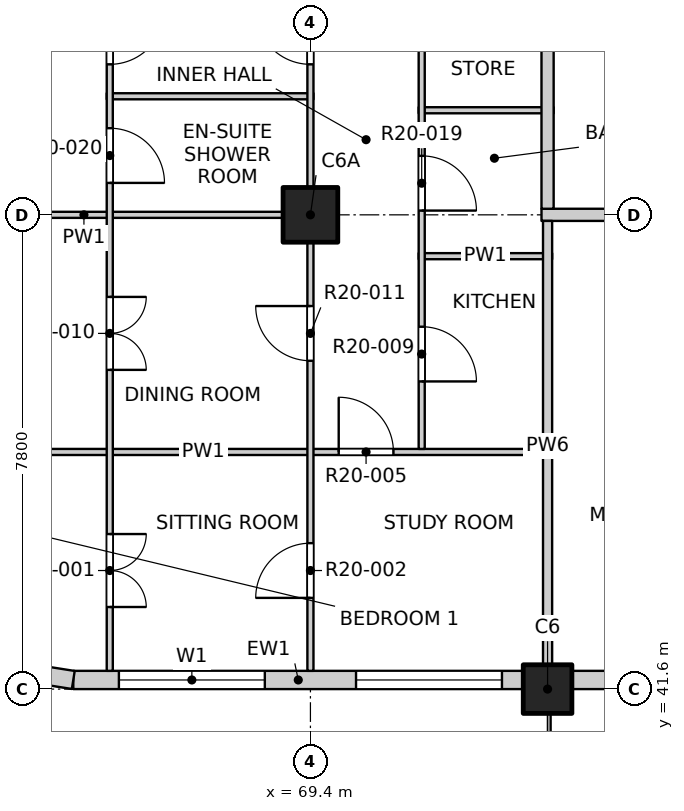
"""IFC4 building model, lengths in metres.
Left out: names, types, materials, properties, quantities, classifications, styles, units other than length and angle.
Written with IfcOpenShell. Run it as: python <this file> out.ifc"""

import sys

from ifc_helpers import new_model, si_unit, direction, frame, frame_2d, origin, origin_2d, place, context, subcontext, project, spatial, rectangle, extrude, element, fill, save


model = new_model("IFC4")
c1 = context("Model", 3, precision=1e-05, world=origin(), true_north=direction((0.0, 1.0)))
c2 = subcontext(c1, "Body", "Model", "MODEL_VIEW")
j1 = project(units=[si_unit("LENGTHUNIT", "METRE"), si_unit("PLANEANGLEUNIT", "RADIAN")], contexts=[c1])
p1 = place(None, origin())
s1 = spatial("IfcSite", under=j1, at=p1, CompositionType="ELEMENT")
p2 = place(p1, origin())
s2 = spatial("IfcBuilding", under=s1, at=p2, CompositionType="ELEMENT")
p3 = place(p2, frame((0.0, 0.0, 210.9)))
s3 = spatial("IfcBuildingStorey", under=s2, at=p3, CompositionType="ELEMENT", Elevation=210.9)
p4 = place(p3, frame((73.3, 41.6, -0.25), z_axis=(0.0, 0.0, 1.0), x_axis=(1.0, 0.0, 0.0)))
e1 = element("IfcColumn", 1, at=p4, inside=s3, PredefinedType="COLUMN", context=c2, shape_type="SweptSolid", body=[
    extrude(rectangle(XDim=0.8, YDim=0.8, at=origin_2d()), origin(), (0.0, 0.0, 1.0), 3.4),
])
p5 = place(p3, frame((69.4, 49.4, -0.25), z_axis=(0.0, 0.0, 1.0), x_axis=(1.0, 0.0, 0.0)))
e2 = element("IfcColumn", 2, at=p5, inside=s3, PredefinedType="COLUMN", context=c2, shape_type="SweptSolid", body=[
    extrude(rectangle(XDim=0.9, YDim=0.9, at=origin_2d()), origin(), (0.0, 0.0, 1.0), 3.4),
])
p6 = place(p3, frame((65.5, 41.75, 0.0), z_axis=(0.0, 0.0, 1.0), x_axis=(1.0, 0.0, 0.0)))
e3 = element("IfcWall", 3, at=p6, inside=s3, PredefinedType="SOLIDWALL", context=c2, shape_type="SweptSolid", body=[
    extrude(rectangle(XDim=7.4, YDim=0.3, at=frame_2d((3.7, 0.0))), origin(), (0.0, 0.0, 1.0), 2.7),
])
p7 = place(p6, frame((0.75, 0.0, 0.9)))
e4 = element("IfcOpeningElement", 4, at=p7, cuts=e3, PredefinedType="OPENING", context=c2, shape_type="SweptSolid", body=[
    extrude(rectangle(XDim=2.4, YDim=1.8, at=frame_2d((1.2, 0.9))), frame((0.0, 0.16, 0.0), z_axis=(0.0, -1.0, 0.0), x_axis=(1.0, 0.0, 0.0)), (0.0, 0.0, 1.0), 0.32),
])
p8 = place(p6, frame((4.65, 0.0, 0.9)))
e5 = element("IfcOpeningElement", 5, at=p8, cuts=e3, PredefinedType="OPENING", context=c2, shape_type="SweptSolid", body=[
    extrude(rectangle(XDim=2.4, YDim=1.8, at=frame_2d((1.2, 0.9))), frame((0.0, 0.16, 0.0), z_axis=(0.0, -1.0, 0.0), x_axis=(1.0, 0.0, 0.0)), (0.0, 0.0, 1.0), 0.32),
])
p9 = place(p3, frame((73.7, 41.75, 0.0), z_axis=(0.0, 0.0, 1.0), x_axis=(1.0, 0.0, 0.0)))
e6 = element("IfcWall", 6, at=p9, inside=s3, PredefinedType="SOLIDWALL", context=c2, shape_type="SweptSolid", body=[
    extrude(rectangle(XDim=7.0, YDim=0.3, at=frame_2d((3.5, 0.0))), origin(), (0.0, 0.0, 1.0), 2.7),
])
p10 = place(p9, frame((0.65, 0.0, 0.0)))
e7 = element("IfcOpeningElement", 7, at=p10, cuts=e6, PredefinedType="OPENING", context=c2, shape_type="SweptSolid", body=[
    extrude(rectangle(XDim=1.8, YDim=2.4, at=frame_2d((0.9, 1.2))), frame((0.0, 0.16, 0.0), z_axis=(0.0, -1.0, 0.0), x_axis=(1.0, 0.0, 0.0)), (0.0, 0.0, 1.0), 0.32),
])
p11 = place(p9, frame((4.25, 0.0, 0.9)))
e8 = element("IfcOpeningElement", 8, at=p11, cuts=e6, PredefinedType="OPENING", context=c2, shape_type="SweptSolid", body=[
    extrude(rectangle(XDim=2.4, YDim=1.8, at=frame_2d((1.2, 0.9))), frame((0.0, 0.16, 0.0), z_axis=(0.0, -1.0, 0.0), x_axis=(1.0, 0.0, 0.0)), (0.0, 0.0, 1.0), 0.32),
])
p12 = place(p3, frame((64.341, 41.934, 0.0), z_axis=(0.0, 0.0, 1.0), x_axis=(0.987678452879, -0.156496880861, 0.0)))
e9 = element("IfcWall", 9, at=p12, inside=s3, PredefinedType="SOLIDWALL", context=c2, shape_type="SweptSolid", body=[
    extrude(rectangle(XDim=1.173, YDim=0.3, at=frame_2d((0.586, 0.0))), origin(), (0.0, 0.0, 1.0), 2.7),
])
p13 = place(p3, frame((61.9, 45.5, 0.0), z_axis=(0.0, 0.0, 1.0), x_axis=(1.0, 0.0, 0.0)))
e10 = element("IfcWall", 10, at=p13, inside=s3, PredefinedType="PARTITIONING", context=c2, shape_type="SweptSolid", body=[
    extrude(rectangle(XDim=11.475, YDim=0.1, at=frame_2d((5.737, 0.0))), origin(), (0.0, 0.0, 1.0), 3.15),
])
p14 = place(p13, frame((7.965, 0.0, 0.0)))
e11 = element("IfcOpeningElement", 11, at=p14, cuts=e10, PredefinedType="OPENING", context=c2, shape_type="SweptSolid", body=[
    extrude(rectangle(XDim=0.9, YDim=2.1, at=frame_2d((0.45, 1.05))), frame((0.0, 0.06, 0.0), z_axis=(0.0, -1.0, 0.0), x_axis=(1.0, 0.0, 0.0)), (0.0, 0.0, 1.0), 0.12),
])
p15 = place(p3, frame((71.18, 48.72, 0.0), z_axis=(0.0, 0.0, 1.0), x_axis=(1.0, 0.0, 0.0)))
e12 = element("IfcWall", 12, at=p15, inside=s3, PredefinedType="PARTITIONING", context=c2, shape_type="SweptSolid", body=[
    extrude(rectangle(XDim=2.195, YDim=0.1, at=frame_2d((1.097, 0.0))), origin(), (0.0, 0.0, 1.0), 3.15),
])
p16 = place(p3, frame((61.9, 49.4, 0.0), z_axis=(0.0, 0.0, 1.0), x_axis=(1.0, 0.0, 0.0)))
e13 = element("IfcWall", 13, at=p16, inside=s3, PredefinedType="PARTITIONING", context=c2, shape_type="SweptSolid", body=[
    extrude(rectangle(XDim=7.55, YDim=0.1, at=frame_2d((3.775, 0.0))), origin(), (0.0, 0.0, 1.0), 3.15),
])
p17 = place(p3, frame((73.2, 49.4, 0.0), z_axis=(0.0, 0.0, 1.0), x_axis=(1.0, 0.0, 0.0)))
e14 = element("IfcWall", 14, at=p17, inside=s3, PredefinedType="PARTITIONING", context=c2, shape_type="SweptSolid", body=[
    extrude(rectangle(XDim=23.6, YDim=0.2, at=frame_2d((11.8, 0.0))), origin(), (0.0, 0.0, 1.0), 3.15),
])
p18 = place(p17, frame((1.6, 0.0, 0.0)))
e15 = element("IfcOpeningElement", 15, at=p18, cuts=e14, PredefinedType="OPENING", context=c2, shape_type="SweptSolid", body=[
    extrude(rectangle(XDim=0.9, YDim=2.1, at=frame_2d((0.45, 1.05))), frame((0.0, 0.11, 0.0), z_axis=(0.0, -1.0, 0.0), x_axis=(1.0, 0.0, 0.0)), (0.0, 0.0, 1.0), 0.22),
])
p19 = place(p17, frame((5.5, 0.0, 0.0)))
e16 = element("IfcOpeningElement", 16, at=p19, cuts=e14, PredefinedType="OPENING", context=c2, shape_type="SweptSolid", body=[
    extrude(rectangle(XDim=0.9, YDim=2.1, at=frame_2d((0.45, 1.05))), frame((0.0, 0.11, 0.0), z_axis=(0.0, -1.0, 0.0), x_axis=(1.0, 0.0, 0.0)), (0.0, 0.0, 1.0), 0.22),
])
p20 = place(p17, frame((12.375, 0.0, 0.0)))
e17 = element("IfcOpeningElement", 17, at=p20, cuts=e14, PredefinedType="OPENING", context=c2, shape_type="SweptSolid", body=[
    extrude(rectangle(XDim=1.2, YDim=2.1, at=frame_2d((0.6, 1.05))), frame((0.0, 0.11, 0.0), z_axis=(0.0, -1.0, 0.0), x_axis=(1.0, 0.0, 0.0)), (0.0, 0.0, 1.0), 0.22),
])
p21 = place(p17, frame((20.15, 0.0, 0.0)))
e18 = element("IfcOpeningElement", 18, at=p21, cuts=e14, PredefinedType="OPENING", context=c2, shape_type="SweptSolid", body=[
    extrude(rectangle(XDim=1.2, YDim=2.1, at=frame_2d((0.6, 1.05))), frame((0.0, 0.11, 0.0), z_axis=(0.0, -1.0, 0.0), x_axis=(1.0, 0.0, 0.0)), (0.0, 0.0, 1.0), 0.22),
])
p22 = place(p3, frame((71.18, 51.12, 0.0), z_axis=(0.0, 0.0, 1.0), x_axis=(1.0, 0.0, 0.0)))
e19 = element("IfcWall", 19, at=p22, inside=s3, PredefinedType="PARTITIONING", context=c2, shape_type="SweptSolid", body=[
    extrude(rectangle(XDim=2.22, YDim=0.1, at=frame_2d((1.11, 0.0))), origin(), (0.0, 0.0, 1.0), 3.15),
])
p23 = place(p3, frame((66.05, 51.35, 0.0), z_axis=(0.0, 0.0, 1.0), x_axis=(1.0, 0.0, 0.0)))
e20 = element("IfcWall", 20, at=p23, inside=s3, PredefinedType="PARTITIONING", context=c2, shape_type="SweptSolid", body=[
    extrude(rectangle(XDim=3.4, YDim=0.1, at=frame_2d((1.7, 0.0))), origin(), (0.0, 0.0, 1.0), 3.15),
])
p24 = place(p3, frame((66.1, 41.9, 0.0), z_axis=(0.0, 0.0, 1.0), x_axis=(0.0, 1.0, 0.0)))
e21 = element("IfcWall", 21, at=p24, inside=s3, PredefinedType="PARTITIONING", context=c2, shape_type="SweptSolid", body=[
    extrude(rectangle(XDim=19.1, YDim=0.1, at=frame_2d((9.55, 0.0))), origin(), (0.0, 0.0, 1.0), 3.15),
])
p25 = place(p24, frame((1.05, 0.0, 0.0)))
e22 = element("IfcOpeningElement", 22, at=p25, cuts=e21, PredefinedType="OPENING", context=c2, shape_type="SweptSolid", body=[
    extrude(rectangle(XDim=1.2, YDim=2.1, at=frame_2d((0.6, 1.05))), frame((0.0, 0.06, 0.0), z_axis=(0.0, -1.0, 0.0), x_axis=(1.0, 0.0, 0.0)), (0.0, 0.0, 1.0), 0.12),
])
p26 = place(p24, frame((4.95, 0.0, 0.0)))
e23 = element("IfcOpeningElement", 23, at=p26, cuts=e21, PredefinedType="OPENING", context=c2, shape_type="SweptSolid", body=[
    extrude(rectangle(XDim=1.2, YDim=2.1, at=frame_2d((0.6, 1.05))), frame((0.0, 0.06, 0.0), z_axis=(0.0, -1.0, 0.0), x_axis=(1.0, 0.0, 0.0)), (0.0, 0.0, 1.0), 0.12),
])
p27 = place(p24, frame((8.025, 0.0, 0.0)))
e24 = element("IfcOpeningElement", 24, at=p27, cuts=e21, PredefinedType="OPENING", context=c2, shape_type="SweptSolid", body=[
    extrude(rectangle(XDim=0.9, YDim=2.1, at=frame_2d((0.45, 1.05))), frame((0.0, 0.06, 0.0), z_axis=(0.0, -1.0, 0.0), x_axis=(1.0, 0.0, 0.0)), (0.0, 0.0, 1.0), 0.12),
])
p28 = place(p24, frame((9.975, 0.0, 0.0)))
e25 = element("IfcOpeningElement", 25, at=p28, cuts=e21, PredefinedType="OPENING", context=c2, shape_type="SweptSolid", body=[
    extrude(rectangle(XDim=0.9, YDim=2.1, at=frame_2d((0.45, 1.05))), frame((0.0, 0.06, 0.0), z_axis=(0.0, -1.0, 0.0), x_axis=(1.0, 0.0, 0.0)), (0.0, 0.0, 1.0), 0.12),
])
p29 = place(p24, frame((12.75, 0.0, 0.0)))
e26 = element("IfcOpeningElement", 26, at=p29, cuts=e21, PredefinedType="OPENING", context=c2, shape_type="SweptSolid", body=[
    extrude(rectangle(XDim=1.2, YDim=2.1, at=frame_2d((0.6, 1.05))), frame((0.0, 0.06, 0.0), z_axis=(0.0, -1.0, 0.0), x_axis=(1.0, 0.0, 0.0)), (0.0, 0.0, 1.0), 0.12),
])
p30 = place(p24, frame((15.825, 0.0, 0.0)))
e27 = element("IfcOpeningElement", 27, at=p30, cuts=e21, PredefinedType="OPENING", context=c2, shape_type="SweptSolid", body=[
    extrude(rectangle(XDim=0.9, YDim=2.1, at=frame_2d((0.45, 1.05))), frame((0.0, 0.06, 0.0), z_axis=(0.0, -1.0, 0.0), x_axis=(1.0, 0.0, 0.0)), (0.0, 0.0, 1.0), 0.12),
])
p31 = place(p24, frame((17.775, 0.0, 0.0)))
e28 = element("IfcOpeningElement", 28, at=p31, cuts=e21, PredefinedType="OPENING", context=c2, shape_type="SweptSolid", body=[
    extrude(rectangle(XDim=0.9, YDim=2.1, at=frame_2d((0.45, 1.05))), frame((0.0, 0.06, 0.0), z_axis=(0.0, -1.0, 0.0), x_axis=(1.0, 0.0, 0.0)), (0.0, 0.0, 1.0), 0.12),
])
p32 = place(p3, frame((69.4, 41.9, 0.0), z_axis=(0.0, 0.0, 1.0), x_axis=(0.0, 1.0, 0.0)))
e29 = element("IfcWall", 29, at=p32, inside=s3, PredefinedType="PARTITIONING", context=c2, shape_type="SweptSolid", body=[
    extrude(rectangle(XDim=46.2, YDim=0.1, at=frame_2d((23.1, 0.0))), origin(), (0.0, 0.0, 1.0), 3.15),
])
p33 = place(p32, frame((1.2, 0.0, 0.0)))
e30 = element("IfcOpeningElement", 30, at=p33, cuts=e29, PredefinedType="OPENING", context=c2, shape_type="SweptSolid", body=[
    extrude(rectangle(XDim=0.9, YDim=2.1, at=frame_2d((0.45, 1.05))), frame((0.0, 0.06, 0.0), z_axis=(0.0, -1.0, 0.0), x_axis=(1.0, 0.0, 0.0)), (0.0, 0.0, 1.0), 0.12),
])
p34 = place(p32, frame((5.1, 0.0, 0.0)))
e31 = element("IfcOpeningElement", 31, at=p34, cuts=e29, PredefinedType="OPENING", context=c2, shape_type="SweptSolid", body=[
    extrude(rectangle(XDim=0.9, YDim=2.1, at=frame_2d((0.45, 1.05))), frame((0.0, 0.06, 0.0), z_axis=(0.0, -1.0, 0.0), x_axis=(1.0, 0.0, 0.0)), (0.0, 0.0, 1.0), 0.12),
])
p35 = place(p32, frame((9.975, 0.0, 0.0)))
e32 = element("IfcOpeningElement", 32, at=p35, cuts=e29, PredefinedType="OPENING", context=c2, shape_type="SweptSolid", body=[
    extrude(rectangle(XDim=0.9, YDim=2.1, at=frame_2d((0.45, 1.05))), frame((0.0, 0.06, 0.0), z_axis=(0.0, -1.0, 0.0), x_axis=(1.0, 0.0, 0.0)), (0.0, 0.0, 1.0), 0.12),
])
p36 = place(p32, frame((12.9, 0.0, 0.0)))
e33 = element("IfcOpeningElement", 33, at=p36, cuts=e29, PredefinedType="OPENING", context=c2, shape_type="SweptSolid", body=[
    extrude(rectangle(XDim=0.9, YDim=2.1, at=frame_2d((0.45, 1.05))), frame((0.0, 0.06, 0.0), z_axis=(0.0, -1.0, 0.0), x_axis=(1.0, 0.0, 0.0)), (0.0, 0.0, 1.0), 0.12),
])
p37 = place(p32, frame((17.775, 0.0, 0.0)))
e34 = element("IfcOpeningElement", 34, at=p37, cuts=e29, PredefinedType="OPENING", context=c2, shape_type="SweptSolid", body=[
    extrude(rectangle(XDim=0.9, YDim=2.1, at=frame_2d((0.45, 1.05))), frame((0.0, 0.06, 0.0), z_axis=(0.0, -1.0, 0.0), x_axis=(1.0, 0.0, 0.0)), (0.0, 0.0, 1.0), 0.12),
])
p38 = place(p32, frame((21.625, 0.0, 0.0)))
e35 = element("IfcOpeningElement", 35, at=p38, cuts=e29, PredefinedType="OPENING", context=c2, shape_type="SweptSolid", body=[
    extrude(rectangle(XDim=0.9, YDim=2.1, at=frame_2d((0.45, 1.05))), frame((0.0, 0.06, 0.0), z_axis=(0.0, -1.0, 0.0), x_axis=(1.0, 0.0, 0.0)), (0.0, 0.0, 1.0), 0.12),
])
p39 = place(p32, frame((24.6, 0.0, 0.0)))
e36 = element("IfcOpeningElement", 36, at=p39, cuts=e29, PredefinedType="OPENING", context=c2, shape_type="SweptSolid", body=[
    extrude(rectangle(XDim=0.9, YDim=2.1, at=frame_2d((0.45, 1.05))), frame((0.0, 0.06, 0.0), z_axis=(0.0, -1.0, 0.0), x_axis=(1.0, 0.0, 0.0)), (0.0, 0.0, 1.0), 0.12),
])
p40 = place(p32, frame((28.5, 0.0, 0.0)))
e37 = element("IfcOpeningElement", 37, at=p40, cuts=e29, PredefinedType="OPENING", context=c2, shape_type="SweptSolid", body=[
    extrude(rectangle(XDim=0.9, YDim=2.1, at=frame_2d((0.45, 1.05))), frame((0.0, 0.06, 0.0), z_axis=(0.0, -1.0, 0.0), x_axis=(1.0, 0.0, 0.0)), (0.0, 0.0, 1.0), 0.12),
])
p41 = place(p32, frame((33.375, 0.0, 0.0)))
e38 = element("IfcOpeningElement", 38, at=p41, cuts=e29, PredefinedType="OPENING", context=c2, shape_type="SweptSolid", body=[
    extrude(rectangle(XDim=0.9, YDim=2.1, at=frame_2d((0.45, 1.05))), frame((0.0, 0.06, 0.0), z_axis=(0.0, -1.0, 0.0), x_axis=(1.0, 0.0, 0.0)), (0.0, 0.0, 1.0), 0.12),
])
p42 = place(p32, frame((37.225, 0.0, 0.0)))
e39 = element("IfcOpeningElement", 39, at=p42, cuts=e29, PredefinedType="OPENING", context=c2, shape_type="SweptSolid", body=[
    extrude(rectangle(XDim=0.9, YDim=2.1, at=frame_2d((0.45, 1.05))), frame((0.0, 0.06, 0.0), z_axis=(0.0, -1.0, 0.0), x_axis=(1.0, 0.0, 0.0)), (0.0, 0.0, 1.0), 0.12),
])
p43 = place(p32, frame((40.2, 0.0, 0.0)))
e40 = element("IfcOpeningElement", 40, at=p43, cuts=e29, PredefinedType="OPENING", context=c2, shape_type="SweptSolid", body=[
    extrude(rectangle(XDim=0.9, YDim=2.1, at=frame_2d((0.45, 1.05))), frame((0.0, 0.06, 0.0), z_axis=(0.0, -1.0, 0.0), x_axis=(1.0, 0.0, 0.0)), (0.0, 0.0, 1.0), 0.12),
])
p44 = place(p32, frame((44.1, 0.0, 0.0)))
e41 = element("IfcOpeningElement", 41, at=p44, cuts=e29, PredefinedType="OPENING", context=c2, shape_type="SweptSolid", body=[
    extrude(rectangle(XDim=0.9, YDim=2.1, at=frame_2d((0.45, 1.05))), frame((0.0, 0.06, 0.0), z_axis=(0.0, -1.0, 0.0), x_axis=(1.0, 0.0, 0.0)), (0.0, 0.0, 1.0), 0.12),
])
p45 = place(p3, frame((71.23, 45.55, 0.0), z_axis=(0.0, 0.0, 1.0), x_axis=(0.0, 1.0, 0.0)))
e42 = element("IfcWall", 42, at=p45, inside=s3, PredefinedType="PARTITIONING", context=c2, shape_type="SweptSolid", body=[
    extrude(rectangle(XDim=8.3, YDim=0.1, at=frame_2d((4.15, 0.0))), origin(), (0.0, 0.0, 1.0), 3.15),
])
p46 = place(p45, frame((1.11, 0.0, 0.0)))
e43 = element("IfcOpeningElement", 43, at=p46, cuts=e42, PredefinedType="OPENING", context=c2, shape_type="SweptSolid", body=[
    extrude(rectangle(XDim=0.9, YDim=2.1, at=frame_2d((0.45, 1.05))), frame((0.0, 0.06, 0.0), z_axis=(0.0, -1.0, 0.0), x_axis=(1.0, 0.0, 0.0)), (0.0, 0.0, 1.0), 0.12),
])
p47 = place(p45, frame((3.92, 0.0, 0.0)))
e44 = element("IfcOpeningElement", 44, at=p47, cuts=e42, PredefinedType="OPENING", context=c2, shape_type="SweptSolid", body=[
    extrude(rectangle(XDim=0.9, YDim=2.1, at=frame_2d((0.45, 1.05))), frame((0.0, 0.06, 0.0), z_axis=(0.0, -1.0, 0.0), x_axis=(1.0, 0.0, 0.0)), (0.0, 0.0, 1.0), 0.12),
])
p48 = place(p45, frame((6.56, 0.0, 0.0)))
e45 = element("IfcOpeningElement", 45, at=p48, cuts=e42, PredefinedType="OPENING", context=c2, shape_type="SweptSolid", body=[
    extrude(rectangle(XDim=0.8, YDim=2.1, at=frame_2d((0.4, 1.05))), frame((0.0, 0.06, 0.0), z_axis=(0.0, -1.0, 0.0), x_axis=(1.0, 0.0, 0.0)), (0.0, 0.0, 1.0), 0.12),
])
p49 = place(p3, frame((73.3, 41.9, 0.0), z_axis=(0.0, 0.0, 1.0), x_axis=(0.0, 1.0, 0.0)))
e46 = element("IfcWall", 46, at=p49, inside=s3, PredefinedType="PARTITIONING", context=c2, shape_type="SweptSolid", body=[
    extrude(rectangle(XDim=7.4, YDim=0.15, at=frame_2d((3.7, 0.0))), origin(), (0.0, 0.0, 1.0), 3.15),
])
p50 = place(p3, frame((73.3, 49.5, 0.0), z_axis=(0.0, 0.0, 1.0), x_axis=(0.0, 1.0, 0.0)))
e47 = element("IfcWall", 47, at=p50, inside=s3, PredefinedType="PARTITIONING", context=c2, shape_type="SweptSolid", body=[
    extrude(rectangle(XDim=34.9, YDim=0.2, at=frame_2d((17.45, 0.0))), origin(), (0.0, 0.0, 1.0), 3.15),
])
p51 = place(p50, frame((3.225, 0.0, 0.0)))
e48 = element("IfcOpeningElement", 48, at=p51, cuts=e47, PredefinedType="OPENING", context=c2, shape_type="SweptSolid", body=[
    extrude(rectangle(XDim=1.0, YDim=2.1, at=frame_2d((0.5, 1.05))), frame((0.0, 0.11, 0.0), z_axis=(0.0, -1.0, 0.0), x_axis=(1.0, 0.0, 0.0)), (0.0, 0.0, 1.0), 0.22),
])
p52 = place(p50, frame((25.125, 0.0, 0.0)))
e49 = element("IfcOpeningElement", 49, at=p52, cuts=e47, PredefinedType="OPENING", context=c2, shape_type="SweptSolid", body=[
    extrude(rectangle(XDim=1.0, YDim=2.1, at=frame_2d((0.5, 1.05))), frame((0.0, 0.11, 0.0), z_axis=(0.0, -1.0, 0.0), x_axis=(1.0, 0.0, 0.0)), (0.0, 0.0, 1.0), 0.22),
])
p53 = place(p50, frame((31.475, 0.0, 0.0)))
e50 = element("IfcOpeningElement", 50, at=p53, cuts=e47, PredefinedType="OPENING", context=c2, shape_type="SweptSolid", body=[
    extrude(rectangle(XDim=1.0, YDim=2.1, at=frame_2d((0.5, 1.05))), frame((0.0, 0.11, 0.0), z_axis=(0.0, -1.0, 0.0), x_axis=(1.0, 0.0, 0.0)), (0.0, 0.0, 1.0), 0.22),
])
p54 = place(p7, origin())
e51 = element("IfcWindow", 51, at=p54, inside=s3, PartitioningType="DOUBLE_PANEL_VERTICAL", PredefinedType="WINDOW", context=c2, shape_type="SweptSolid", body=[
    extrude(rectangle(XDim=2.4, YDim=1.8, at=frame_2d((1.2, 0.9))), frame((0.0, 0.03, 0.0), z_axis=(0.0, -1.0, 0.0), x_axis=(1.0, 0.0, 0.0)), (0.0, 0.0, 1.0), 0.06),
])
fill(e4, e51)
p55 = place(p8, origin())
e52 = element("IfcWindow", 52, at=p55, inside=s3, PartitioningType="DOUBLE_PANEL_VERTICAL", PredefinedType="WINDOW", context=c2, shape_type="SweptSolid", body=[
    extrude(rectangle(XDim=2.4, YDim=1.8, at=frame_2d((1.2, 0.9))), frame((0.0, 0.03, 0.0), z_axis=(0.0, -1.0, 0.0), x_axis=(1.0, 0.0, 0.0)), (0.0, 0.0, 1.0), 0.06),
])
fill(e5, e52)
p56 = place(p25, origin())
e53 = element("IfcDoor", 53, at=p56, inside=s3, OperationType="DOUBLE_DOOR_SINGLE_SWING", PredefinedType="DOOR", context=c2, shape_type="SweptSolid", body=[
    extrude(rectangle(XDim=1.2, YDim=2.1, at=frame_2d((0.6, 1.05))), frame((0.0, 0.025, 0.0), z_axis=(0.0, -1.0, 0.0), x_axis=(1.0, 0.0, 0.0)), (0.0, 0.0, 1.0), 0.05),
])
fill(e22, e53)
p57 = place(p33, origin())
e54 = element("IfcDoor", 54, at=p57, inside=s3, OperationType="SINGLE_SWING_LEFT", PredefinedType="DOOR", context=c2, shape_type="SweptSolid", body=[
    extrude(rectangle(XDim=0.9, YDim=2.1, at=frame_2d((0.45, 1.05))), frame((0.0, 0.025, 0.0), z_axis=(0.0, -1.0, 0.0), x_axis=(1.0, 0.0, 0.0)), (0.0, 0.0, 1.0), 0.05),
])
fill(e30, e54)
p58 = place(p14, origin())
e55 = element("IfcDoor", 55, at=p58, inside=s3, OperationType="SINGLE_SWING_LEFT", PredefinedType="DOOR", context=c2, shape_type="SweptSolid", body=[
    extrude(rectangle(XDim=0.9, YDim=2.1, at=frame_2d((0.45, 1.05))), frame((0.0, 0.025, 0.0), z_axis=(0.0, -1.0, 0.0), x_axis=(1.0, 0.0, 0.0)), (0.0, 0.0, 1.0), 0.05),
])
fill(e11, e55)
p59 = place(p46, origin())
e56 = element("IfcDoor", 56, at=p59, inside=s3, OperationType="SINGLE_SWING_RIGHT", PredefinedType="DOOR", context=c2, shape_type="SweptSolid", body=[
    extrude(rectangle(XDim=0.9, YDim=2.1, at=frame_2d((0.45, 1.05))), frame((0.0, 0.025, 0.0), z_axis=(0.0, -1.0, 0.0), x_axis=(1.0, 0.0, 0.0)), (0.0, 0.0, 1.0), 0.05),
])
fill(e43, e56)
p60 = place(p26, origin())
e57 = element("IfcDoor", 57, at=p60, inside=s3, OperationType="DOUBLE_DOOR_SINGLE_SWING", PredefinedType="DOOR", context=c2, shape_type="SweptSolid", body=[
    extrude(rectangle(XDim=1.2, YDim=2.1, at=frame_2d((0.6, 1.05))), frame((0.0, 0.025, 0.0), z_axis=(0.0, -1.0, 0.0), x_axis=(1.0, 0.0, 0.0)), (0.0, 0.0, 1.0), 0.05),
])
fill(e23, e57)
p61 = place(p34, origin())
e58 = element("IfcDoor", 58, at=p61, inside=s3, OperationType="SINGLE_SWING_RIGHT", PredefinedType="DOOR", context=c2, shape_type="SweptSolid", body=[
    extrude(rectangle(XDim=0.9, YDim=2.1, at=frame_2d((0.45, 1.05))), frame((0.0, 0.025, 0.0), z_axis=(0.0, -1.0, 0.0), x_axis=(1.0, 0.0, 0.0)), (0.0, 0.0, 1.0), 0.05),
])
fill(e31, e58)
p62 = place(p47, origin())
e59 = element("IfcDoor", 59, at=p62, inside=s3, OperationType="SINGLE_SWING_RIGHT", PredefinedType="DOOR", context=c2, shape_type="SweptSolid", body=[
    extrude(rectangle(XDim=0.9, YDim=2.1, at=frame_2d((0.45, 1.05))), frame((0.0, 0.025, 0.0), z_axis=(0.0, -1.0, 0.0), x_axis=(1.0, 0.0, 0.0)), (0.0, 0.0, 1.0), 0.05),
])
fill(e44, e59)
p63 = place(p27, origin())
e60 = element("IfcDoor", 60, at=p63, inside=s3, OperationType="SINGLE_SWING_RIGHT", PredefinedType="DOOR", context=c2, shape_type="SweptSolid", body=[
    extrude(rectangle(XDim=0.9, YDim=2.1, at=frame_2d((0.45, 1.05))), frame((0.0, 0.025, 0.0), z_axis=(0.0, -1.0, 0.0), x_axis=(1.0, 0.0, 0.0)), (0.0, 0.0, 1.0), 0.05),
])
fill(e24, e60)
p64 = place(p28, origin())
e61 = element("IfcDoor", 61, at=p64, inside=s3, OperationType="SINGLE_SWING_LEFT", PredefinedType="DOOR", context=c2, shape_type="SweptSolid", body=[
    extrude(rectangle(XDim=0.9, YDim=2.1, at=frame_2d((0.45, 1.05))), frame((0.0, 0.025, 0.0), z_axis=(0.0, -1.0, 0.0), x_axis=(1.0, 0.0, 0.0)), (0.0, 0.0, 1.0), 0.05),
])
fill(e25, e61)
p65 = place(p35, origin())
e62 = element("IfcDoor", 62, at=p65, inside=s3, OperationType="SINGLE_SWING_RIGHT", PredefinedType="DOOR", context=c2, shape_type="SweptSolid", body=[
    extrude(rectangle(XDim=0.9, YDim=2.1, at=frame_2d((0.45, 1.05))), frame((0.0, 0.025, 0.0), z_axis=(0.0, -1.0, 0.0), x_axis=(1.0, 0.0, 0.0)), (0.0, 0.0, 1.0), 0.05),
])
fill(e32, e62)
save(model, sys.argv[1])
